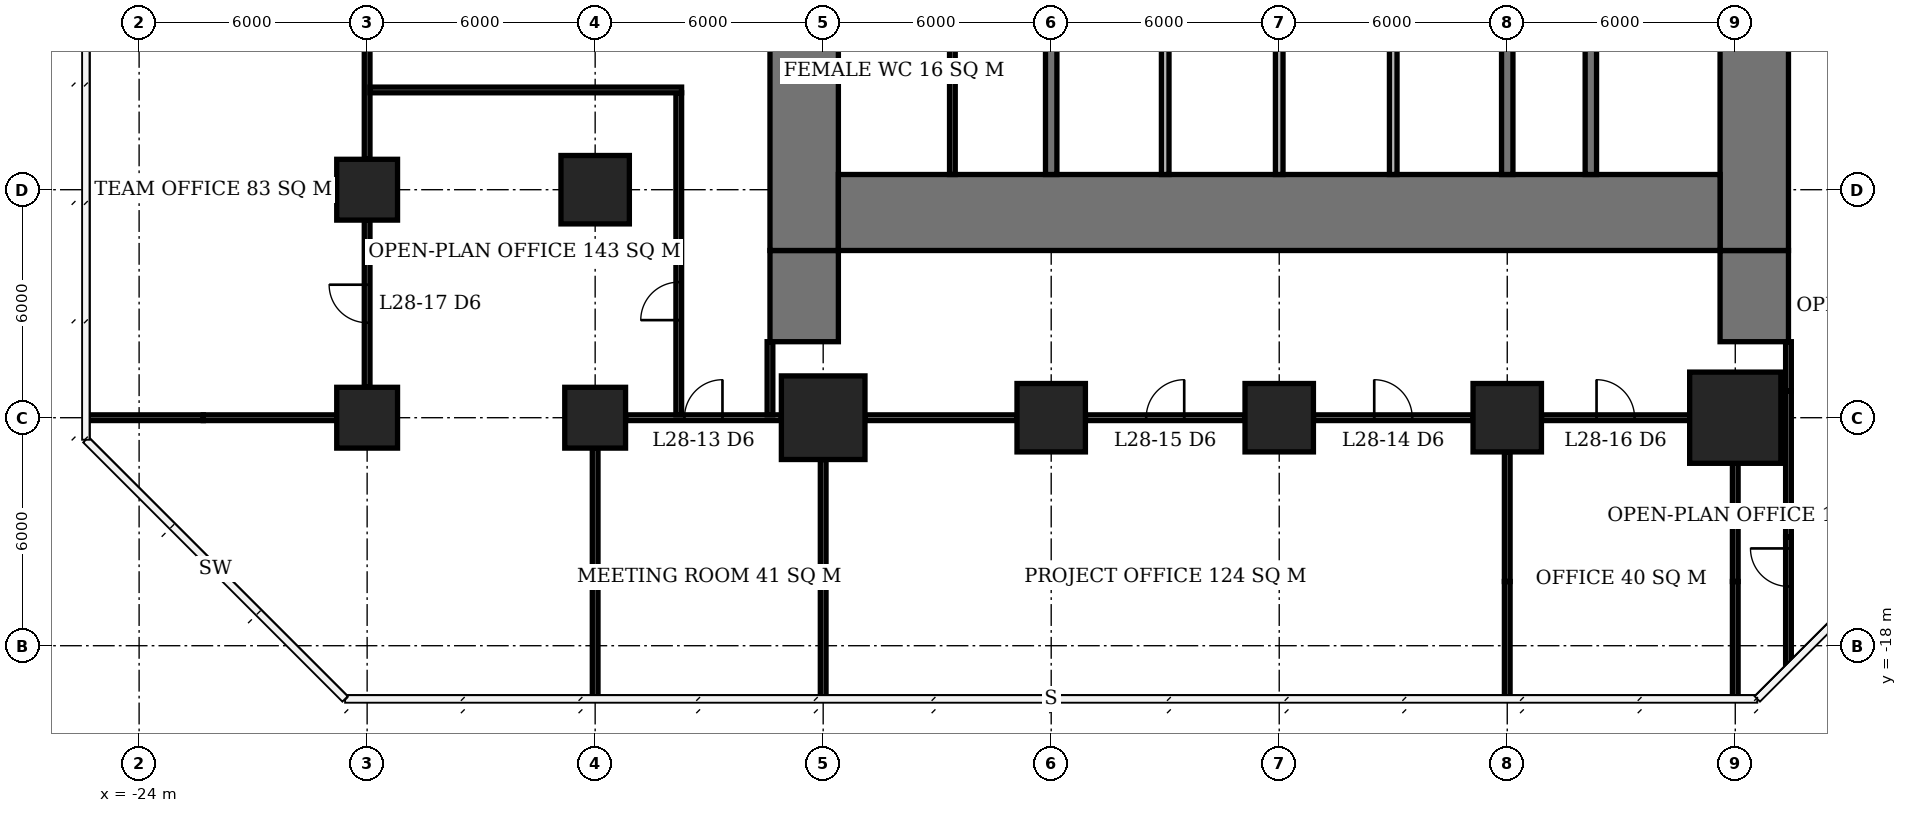
"""IFC4 building model, lengths in metres.
Left out: names, types, materials, properties, quantities, classifications, styles, units other than length and angle.
Written with IfcOpenShell. Run it as: python <this file> out.ifc"""

import sys

from ifc_helpers import new_model, si_unit, direction, frame, frame_2d, origin, origin_2d, place, context, subcontext, project, spatial, rectangle, extrude, element, fill, save


model = new_model("IFC4")
c1 = context("Model", 3, precision=1e-05, world=origin(), true_north=direction((0.0, 1.0)))
c2 = subcontext(c1, "Body", "Model", "MODEL_VIEW")
j1 = project(units=[si_unit("LENGTHUNIT", "METRE"), si_unit("PLANEANGLEUNIT", "RADIAN")], contexts=[c1])
p1 = place(None, origin())
s1 = spatial("IfcSite", under=j1, at=p1, CompositionType="ELEMENT")
p2 = place(p1, origin())
s2 = spatial("IfcBuilding", under=s1, at=p2, CompositionType="ELEMENT")
p3 = place(p2, frame((0.0, 0.0, 117.2)))
s3 = spatial("IfcBuildingStorey", under=s2, at=p3, CompositionType="ELEMENT", Elevation=117.2)
for number, where, z_axis, x_axis in (
    (1, (-18.0, -12.0, 0.0), (0.0, 0.0, 1.0), (1.0, 0.0, 0.0)),
    (2, (-18.0, -6.0, 0.0), (0.0, 0.0, 1.0), (1.0, 0.0, 0.0)),
    (3, (-12.0, -12.0, 0.0), (0.0, 0.0, 1.0), (1.0, 0.0, 0.0)),
):
    element("IfcColumn", number, at=place(p3, frame(where, z_axis=z_axis, x_axis=x_axis)), inside=s3, PredefinedType="COLUMN", context=c2, shape_type="SweptSolid", body=[
        extrude(rectangle(XDim=1.6, YDim=1.6, at=origin_2d()), origin(), (0.0, 0.0, 1.0), 3.9),
    ])
p4 = place(p3, frame((-12.0, -6.0, 0.0), z_axis=(0.0, 0.0, 1.0), x_axis=(1.0, 0.0, 0.0)))
e4 = element("IfcColumn", 4, at=p4, inside=s3, PredefinedType="COLUMN", context=c2, shape_type="SweptSolid", body=[
    extrude(rectangle(XDim=1.8, YDim=1.8, at=origin_2d()), origin(), (0.0, 0.0, 1.0), 3.9),
])
p5 = place(p3, frame((-6.0, -12.0, 0.0), z_axis=(0.0, 0.0, 1.0), x_axis=(1.0, 0.0, 0.0)))
e5 = element("IfcColumn", 5, at=p5, inside=s3, PredefinedType="COLUMN", context=c2, shape_type="SweptSolid", body=[
    extrude(rectangle(XDim=2.2, YDim=2.2, at=origin_2d()), origin(), (0.0, 0.0, 1.0), 3.9),
])
for number, where, z_axis, x_axis in (
    (6, (0.0, -12.0, 0.0), (0.0, 0.0, 1.0), (1.0, 0.0, 0.0)),
    (7, (6.0, -12.0, 0.0), (0.0, 0.0, 1.0), (1.0, 0.0, 0.0)),
    (8, (12.0, -12.0, 0.0), (0.0, 0.0, 1.0), (1.0, 0.0, 0.0)),
):
    element("IfcColumn", number, at=place(p3, frame(where, z_axis=z_axis, x_axis=x_axis)), inside=s3, PredefinedType="COLUMN", context=c2, shape_type="SweptSolid", body=[
        extrude(rectangle(XDim=1.8, YDim=1.8, at=origin_2d()), origin(), (0.0, 0.0, 1.0), 3.9),
    ])
p6 = place(p3, frame((18.0, -12.0, 0.0), z_axis=(0.0, 0.0, 1.0), x_axis=(1.0, 0.0, 0.0)))
e9 = element("IfcColumn", 9, at=p6, inside=s3, PredefinedType="COLUMN", context=c2, shape_type="SweptSolid", body=[
    extrude(rectangle(XDim=2.4, YDim=2.4, at=origin_2d()), origin(), (0.0, 0.0, 1.0), 3.9),
])
p7 = place(p3, frame((-5.6, -6.6, 0.0), z_axis=(0.0, 0.0, 1.0), x_axis=(1.0, 0.0, 0.0)))
e10 = element("IfcWall", 10, at=p7, inside=s3, PredefinedType="SHEAR", context=c2, shape_type="SweptSolid", body=[
    extrude(rectangle(XDim=23.2, YDim=2.0, at=frame_2d((11.6, 0.0))), origin(), (0.0, 0.0, 1.0), 3.9),
])
p8 = place(p3, frame((-6.5, -7.6, 0.0), z_axis=(0.0, 0.0, 1.0), x_axis=(0.0, 1.0, 0.0)))
e11 = element("IfcWall", 11, at=p8, inside=s3, PredefinedType="SHEAR", context=c2, shape_type="SweptSolid", body=[
    extrude(rectangle(XDim=21.2, YDim=1.8, at=frame_2d((10.6, 0.0))), origin(), (0.0, 0.0, 1.0), 3.9),
])
p9 = place(p8, frame((7.8, 0.0, 0.0)))
e12 = element("IfcOpeningElement", 12, at=p9, cuts=e11, PredefinedType="OPENING", context=c2, shape_type="SweptSolid", body=[
    extrude(rectangle(XDim=1.8, YDim=2.4, at=frame_2d((0.9, 1.2))), frame((0.0, 0.91, 0.0), z_axis=(0.0, -1.0, 0.0), x_axis=(1.0, 0.0, 0.0)), (0.0, 0.0, 1.0), 1.82),
])
p10 = place(p3, frame((18.5, -7.6, 0.0), z_axis=(0.0, 0.0, 1.0), x_axis=(0.0, 1.0, 0.0)))
e13 = element("IfcWall", 13, at=p10, inside=s3, PredefinedType="SHEAR", context=c2, shape_type="SweptSolid", body=[
    extrude(rectangle(XDim=21.2, YDim=1.8, at=frame_2d((10.6, 0.0))), origin(), (0.0, 0.0, 1.0), 3.9),
])
p11 = place(p10, frame((9.2, 0.0, 0.0)))
e14 = element("IfcOpeningElement", 14, at=p11, cuts=e13, PredefinedType="OPENING", context=c2, shape_type="SweptSolid", body=[
    extrude(rectangle(XDim=1.8, YDim=2.4, at=frame_2d((0.9, 1.2))), frame((0.0, 0.91, 0.0), z_axis=(0.0, -1.0, 0.0), x_axis=(1.0, 0.0, 0.0)), (0.0, 0.0, 1.0), 1.82),
])
for number, where, z_axis, x_axis in (
    (15, (-6.5, -10.0, 0.0), (0.0, 0.0, 1.0), (0.0, 1.0, 0.0)),
    (16, (18.5, -10.0, 0.0), (0.0, 0.0, 1.0), (0.0, 1.0, 0.0)),
):
    element("IfcWall", number, at=place(p3, frame(where, z_axis=z_axis, x_axis=x_axis)), inside=s3, PredefinedType="SHEAR", context=c2, shape_type="SweptSolid", body=[
        extrude(rectangle(XDim=2.4, YDim=1.8, at=frame_2d((1.2, 0.0))), origin(), (0.0, 0.0, 1.0), 3.9),
    ])
for number, where, z_axis, x_axis in (
    (17, (0.0, -5.6, 0.0), (0.0, 0.0, 1.0), (0.0, 1.0, 0.0)),
    (18, (12.0, -5.6, 0.0), (0.0, 0.0, 1.0), (0.0, 1.0, 0.0)),
):
    element("IfcWall", number, at=place(p3, frame(where, z_axis=z_axis, x_axis=x_axis)), inside=s3, PredefinedType="SHEAR", context=c2, shape_type="SweptSolid", body=[
        extrude(rectangle(XDim=5.45, YDim=0.3, at=frame_2d((2.725, 0.0))), origin(), (0.0, 0.0, 1.0), 3.9),
    ])
p12 = place(p3, frame((14.2, -5.6, 0.0), z_axis=(0.0, 0.0, 1.0), x_axis=(0.0, 1.0, 0.0)))
e19 = element("IfcWall", 19, at=p12, inside=s3, PredefinedType="SHEAR", context=c2, shape_type="SweptSolid", body=[
    extrude(rectangle(XDim=8.45, YDim=0.3, at=frame_2d((4.225, 0.0))), origin(), (0.0, 0.0, 1.0), 3.9),
])
for number, where, z_axis, x_axis in (
    (20, (3.0, -5.6, 0.0), (0.0, 0.0, 1.0), (0.0, 1.0, 0.0)),
    (21, (6.0, -5.6, 0.0), (0.0, 0.0, 1.0), (0.0, 1.0, 0.0)),
    (22, (9.0, -5.6, 0.0), (0.0, 0.0, 1.0), (0.0, 1.0, 0.0)),
):
    element("IfcWall", number, at=place(p3, frame(where, z_axis=z_axis, x_axis=x_axis)), inside=s3, PredefinedType="SOLIDWALL", context=c2, shape_type="SweptSolid", body=[
        extrude(rectangle(XDim=5.45, YDim=0.2, at=frame_2d((2.725, 0.0))), origin(), (0.0, 0.0, 1.0), 3.9),
    ])
p13 = place(p3, frame((-2.6, -5.6, 0.0), z_axis=(0.0, 0.0, 1.0), x_axis=(0.0, 1.0, 0.0)))
e23 = element("IfcWall", 23, at=p13, inside=s3, PredefinedType="PLUMBINGWALL", context=c2, shape_type="SweptSolid", body=[
    extrude(rectangle(XDim=5.45, YDim=0.15, at=frame_2d((2.725, 0.0))), origin(), (0.0, 0.0, 1.0), 3.65),
])
p14 = place(p3, frame((-25.4, -12.0, 0.0), z_axis=(0.0, 0.0, 1.0), x_axis=(1.0, 0.0, 0.0)))
e24 = element("IfcWall", 24, at=p14, inside=s3, PredefinedType="PARTITIONING", context=c2, shape_type="SweptSolid", body=[
    extrude(rectangle(XDim=3.09, YDim=0.15, at=frame_2d((1.545, 0.0))), origin(), (0.0, 0.0, 1.0), 3.65),
])
p15 = place(p3, frame((-22.31, -12.0, 0.0), z_axis=(0.0, 0.0, 1.0), x_axis=(1.0, 0.0, 0.0)))
e25 = element("IfcWall", 25, at=p15, inside=s3, PredefinedType="PARTITIONING", context=c2, shape_type="SweptSolid", body=[
    extrude(rectangle(XDim=3.51, YDim=0.15, at=frame_2d((1.755, 0.0))), origin(), (0.0, 0.0, 1.0), 2.65),
])
p16 = place(p3, frame((-11.2, -12.0, 0.0), z_axis=(0.0, 0.0, 1.0), x_axis=(1.0, 0.0, 0.0)))
e26 = element("IfcWall", 26, at=p16, inside=s3, PredefinedType="PARTITIONING", context=c2, shape_type="SweptSolid", body=[
    extrude(rectangle(XDim=4.1, YDim=0.15, at=frame_2d((2.05, 0.0))), origin(), (0.0, 0.0, 1.0), 3.65),
])
p17 = place(p16, frame((1.55, 0.0, 0.0)))
e27 = element("IfcOpeningElement", 27, at=p17, cuts=e26, PredefinedType="OPENING", context=c2, shape_type="SweptSolid", body=[
    extrude(rectangle(XDim=1.0, YDim=2.1, at=frame_2d((0.5, 1.05))), frame((0.0, 0.085, 0.0), z_axis=(0.0, -1.0, 0.0), x_axis=(1.0, 0.0, 0.0)), (0.0, 0.0, 1.0), 0.17),
])
p18 = place(p3, frame((-4.9, -12.0, 0.0), z_axis=(0.0, 0.0, 1.0), x_axis=(1.0, 0.0, 0.0)))
e28 = element("IfcWall", 28, at=p18, inside=s3, PredefinedType="PARTITIONING", context=c2, shape_type="SweptSolid", body=[
    extrude(rectangle(XDim=4.0, YDim=0.15, at=frame_2d((2.0, 0.0))), origin(), (0.0, 0.0, 1.0), 3.65),
])
p19 = place(p3, frame((0.9, -12.0, 0.0), z_axis=(0.0, 0.0, 1.0), x_axis=(1.0, 0.0, 0.0)))
e29 = element("IfcWall", 29, at=p19, inside=s3, PredefinedType="PARTITIONING", context=c2, shape_type="SweptSolid", body=[
    extrude(rectangle(XDim=4.2, YDim=0.15, at=frame_2d((2.1, 0.0))), origin(), (0.0, 0.0, 1.0), 3.65),
])
p20 = place(p19, frame((1.6, 0.0, 0.0)))
e30 = element("IfcOpeningElement", 30, at=p20, cuts=e29, PredefinedType="OPENING", context=c2, shape_type="SweptSolid", body=[
    extrude(rectangle(XDim=1.0, YDim=2.1, at=frame_2d((0.5, 1.05))), frame((0.0, 0.085, 0.0), z_axis=(0.0, -1.0, 0.0), x_axis=(1.0, 0.0, 0.0)), (0.0, 0.0, 1.0), 0.17),
])
p21 = place(p3, frame((6.9, -12.0, 0.0), z_axis=(0.0, 0.0, 1.0), x_axis=(1.0, 0.0, 0.0)))
e31 = element("IfcWall", 31, at=p21, inside=s3, PredefinedType="PARTITIONING", context=c2, shape_type="SweptSolid", body=[
    extrude(rectangle(XDim=4.2, YDim=0.15, at=frame_2d((2.1, 0.0))), origin(), (0.0, 0.0, 1.0), 3.65),
])
p22 = place(p21, frame((1.6, 0.0, 0.0)))
e32 = element("IfcOpeningElement", 32, at=p22, cuts=e31, PredefinedType="OPENING", context=c2, shape_type="SweptSolid", body=[
    extrude(rectangle(XDim=1.0, YDim=2.1, at=frame_2d((0.5, 1.05))), frame((0.0, 0.085, 0.0), z_axis=(0.0, -1.0, 0.0), x_axis=(1.0, 0.0, 0.0)), (0.0, 0.0, 1.0), 0.17),
])
p23 = place(p3, frame((12.9, -12.0, 0.0), z_axis=(0.0, 0.0, 1.0), x_axis=(1.0, 0.0, 0.0)))
e33 = element("IfcWall", 33, at=p23, inside=s3, PredefinedType="PARTITIONING", context=c2, shape_type="SweptSolid", body=[
    extrude(rectangle(XDim=3.9, YDim=0.15, at=frame_2d((1.95, 0.0))), origin(), (0.0, 0.0, 1.0), 3.65),
])
p24 = place(p23, frame((1.45, 0.0, 0.0)))
e34 = element("IfcOpeningElement", 34, at=p24, cuts=e33, PredefinedType="OPENING", context=c2, shape_type="SweptSolid", body=[
    extrude(rectangle(XDim=1.0, YDim=2.1, at=frame_2d((0.5, 1.05))), frame((0.0, 0.085, 0.0), z_axis=(0.0, -1.0, 0.0), x_axis=(1.0, 0.0, 0.0)), (0.0, 0.0, 1.0), 0.17),
])
p25 = place(p3, frame((-18.0, -11.2, 0.0), z_axis=(0.0, 0.0, 1.0), x_axis=(0.0, 1.0, 0.0)))
e35 = element("IfcWall", 35, at=p25, inside=s3, PredefinedType="PARTITIONING", context=c2, shape_type="SweptSolid", body=[
    extrude(rectangle(XDim=4.4, YDim=0.15, at=frame_2d((2.2, 0.0))), origin(), (0.0, 0.0, 1.0), 3.65),
])
p26 = place(p25, frame((1.7, 0.0, 0.0)))
e36 = element("IfcOpeningElement", 36, at=p26, cuts=e35, PredefinedType="OPENING", context=c2, shape_type="SweptSolid", body=[
    extrude(rectangle(XDim=1.0, YDim=2.1, at=frame_2d((0.5, 1.05))), frame((0.0, 0.085, 0.0), z_axis=(0.0, -1.0, 0.0), x_axis=(1.0, 0.0, 0.0)), (0.0, 0.0, 1.0), 0.17),
])
p27 = place(p3, frame((-18.0, -5.2, 0.0), z_axis=(0.0, 0.0, 1.0), x_axis=(0.0, 1.0, 0.0)))
e37 = element("IfcWall", 37, at=p27, inside=s3, PredefinedType="PARTITIONING", context=c2, shape_type="SweptSolid", body=[
    extrude(rectangle(XDim=4.4, YDim=0.15, at=frame_2d((2.2, 0.0))), origin(), (0.0, 0.0, 1.0), 3.65),
])
p28 = place(p3, frame((-12.0, -19.4, 0.0), z_axis=(0.0, 0.0, 1.0), x_axis=(0.0, 1.0, 0.0)))
e38 = element("IfcWall", 38, at=p28, inside=s3, PredefinedType="PARTITIONING", context=c2, shape_type="SweptSolid", body=[
    extrude(rectangle(XDim=3.09, YDim=0.15, at=frame_2d((1.545, 0.0))), origin(), (0.0, 0.0, 1.0), 3.65),
])
p29 = place(p3, frame((-12.0, -16.31, 0.0), z_axis=(0.0, 0.0, 1.0), x_axis=(0.0, 1.0, 0.0)))
e39 = element("IfcWall", 39, at=p29, inside=s3, PredefinedType="PARTITIONING", context=c2, shape_type="SweptSolid", body=[
    extrude(rectangle(XDim=3.51, YDim=0.15, at=frame_2d((1.755, 0.0))), origin(), (0.0, 0.0, 1.0), 2.65),
])
p30 = place(p3, frame((-6.0, -19.4, 0.0), z_axis=(0.0, 0.0, 1.0), x_axis=(0.0, 1.0, 0.0)))
e40 = element("IfcWall", 40, at=p30, inside=s3, PredefinedType="PARTITIONING", context=c2, shape_type="SweptSolid", body=[
    extrude(rectangle(XDim=3.09, YDim=0.15, at=frame_2d((1.545, 0.0))), origin(), (0.0, 0.0, 1.0), 3.65),
])
p31 = place(p3, frame((-6.0, -16.31, 0.0), z_axis=(0.0, 0.0, 1.0), x_axis=(0.0, 1.0, 0.0)))
e41 = element("IfcWall", 41, at=p31, inside=s3, PredefinedType="PARTITIONING", context=c2, shape_type="SweptSolid", body=[
    extrude(rectangle(XDim=3.21, YDim=0.15, at=frame_2d((1.605, 0.0))), origin(), (0.0, 0.0, 1.0), 2.65),
])
p32 = place(p3, frame((12.0, -19.4, 0.0), z_axis=(0.0, 0.0, 1.0), x_axis=(0.0, 1.0, 0.0)))
e42 = element("IfcWall", 42, at=p32, inside=s3, PredefinedType="PARTITIONING", context=c2, shape_type="SweptSolid", body=[
    extrude(rectangle(XDim=3.09, YDim=0.15, at=frame_2d((1.545, 0.0))), origin(), (0.0, 0.0, 1.0), 3.65),
])
p33 = place(p3, frame((12.0, -16.31, 0.0), z_axis=(0.0, 0.0, 1.0), x_axis=(0.0, 1.0, 0.0)))
e43 = element("IfcWall", 43, at=p33, inside=s3, PredefinedType="PARTITIONING", context=c2, shape_type="SweptSolid", body=[
    extrude(rectangle(XDim=3.41, YDim=0.15, at=frame_2d((1.705, 0.0))), origin(), (0.0, 0.0, 1.0), 2.65),
])
p34 = place(p3, frame((18.0, -19.4, 0.0), z_axis=(0.0, 0.0, 1.0), x_axis=(0.0, 1.0, 0.0)))
e44 = element("IfcWall", 44, at=p34, inside=s3, PredefinedType="PARTITIONING", context=c2, shape_type="SweptSolid", body=[
    extrude(rectangle(XDim=3.09, YDim=0.15, at=frame_2d((1.545, 0.0))), origin(), (0.0, 0.0, 1.0), 3.65),
])
p35 = place(p3, frame((18.0, -16.31, 0.0), z_axis=(0.0, 0.0, 1.0), x_axis=(0.0, 1.0, 0.0)))
e45 = element("IfcWall", 45, at=p35, inside=s3, PredefinedType="PARTITIONING", context=c2, shape_type="SweptSolid", body=[
    extrude(rectangle(XDim=3.11, YDim=0.15, at=frame_2d((1.555, 0.0))), origin(), (0.0, 0.0, 1.0), 2.65),
])
p36 = place(p3, frame((-17.925, -3.375, 0.0), z_axis=(0.0, 0.0, 1.0), x_axis=(1.0, 0.0, 0.0)))
e46 = element("IfcWall", 46, at=p36, inside=s3, PredefinedType="PARTITIONING", context=c2, shape_type="SweptSolid", body=[
    extrude(rectangle(XDim=8.2, YDim=0.15, at=frame_2d((4.1, 0.0))), origin(), (0.0, 0.0, 1.0), 3.65),
])
p37 = place(p3, frame((-9.8, -11.925, 0.0), z_axis=(0.0, 0.0, 1.0), x_axis=(0.0, 1.0, 0.0)))
e47 = element("IfcWall", 47, at=p37, inside=s3, PredefinedType="PARTITIONING", context=c2, shape_type="SweptSolid", body=[
    extrude(rectangle(XDim=8.475, YDim=0.15, at=frame_2d((4.238, 0.0))), origin(), (0.0, 0.0, 1.0), 3.65),
])
p38 = place(p37, frame((2.493, 0.0, 0.0)))
e48 = element("IfcOpeningElement", 48, at=p38, cuts=e47, PredefinedType="OPENING", context=c2, shape_type="SweptSolid", body=[
    extrude(rectangle(XDim=1.0, YDim=2.1, at=frame_2d((0.5, 1.05))), frame((0.0, 0.085, 0.0), z_axis=(0.0, -1.0, 0.0), x_axis=(1.0, 0.0, 0.0)), (0.0, 0.0, 1.0), 0.17),
])
p39 = place(p3, frame((-7.4, -11.925, 0.0), z_axis=(0.0, 0.0, 1.0), x_axis=(0.0, 1.0, 0.0)))
e49 = element("IfcWall", 49, at=p39, inside=s3, PredefinedType="PARTITIONING", context=c2, shape_type="SweptSolid", body=[
    extrude(rectangle(XDim=1.925, YDim=0.15, at=frame_2d((0.962, 0.0))), origin(), (0.0, 0.0, 1.0), 3.65),
])
p40 = place(p3, frame((19.4, -18.489, 0.0), z_axis=(0.0, 0.0, 1.0), x_axis=(0.0, 1.0, 0.0)))
e50 = element("IfcWall", 50, at=p40, inside=s3, PredefinedType="PARTITIONING", context=c2, shape_type="SweptSolid", body=[
    extrude(rectangle(XDim=3.349, YDim=0.15, at=frame_2d((1.675, 0.0))), origin(), (0.0, 0.0, 1.0), 3.65),
])
p41 = place(p40, frame((2.049, 0.0, 0.0)))
e51 = element("IfcOpeningElement", 51, at=p41, cuts=e50, PredefinedType="OPENING", context=c2, shape_type="SweptSolid", body=[
    extrude(rectangle(XDim=1.0, YDim=2.1, at=frame_2d((0.5, 1.05))), frame((0.0, 0.085, 0.0), z_axis=(0.0, -1.0, 0.0), x_axis=(1.0, 0.0, 0.0)), (0.0, 0.0, 1.0), 0.17),
])
p42 = place(p3, frame((19.4, -15.14, 0.0), z_axis=(0.0, 0.0, 1.0), x_axis=(0.0, 1.0, 0.0)))
e52 = element("IfcWall", 52, at=p42, inside=s3, PredefinedType="PARTITIONING", context=c2, shape_type="SweptSolid", body=[
    extrude(rectangle(XDim=3.85, YDim=0.15, at=frame_2d((1.925, 0.0))), origin(), (0.0, 0.0, 1.0), 2.65),
])
p43 = place(p3, frame((19.4, -11.29, 0.0), z_axis=(0.0, 0.0, 1.0), x_axis=(0.0, 1.0, 0.0)))
e53 = element("IfcWall", 53, at=p43, inside=s3, PredefinedType="PARTITIONING", context=c2, shape_type="SweptSolid", body=[
    extrude(rectangle(XDim=1.29, YDim=0.15, at=frame_2d((0.645, 0.0))), origin(), (0.0, 0.0, 1.0), 3.65),
])
p44 = place(p17, origin())
e54 = element("IfcDoor", 54, at=p44, inside=s3, OperationType="SINGLE_SWING_RIGHT", PredefinedType="DOOR", context=c2, shape_type="SweptSolid", body=[
    extrude(rectangle(XDim=1.0, YDim=2.1, at=frame_2d((0.5, 1.05))), frame((0.0, 0.025, 0.0), z_axis=(0.0, -1.0, 0.0), x_axis=(1.0, 0.0, 0.0)), (0.0, 0.0, 1.0), 0.05),
])
fill(e27, e54)
p45 = place(p22, origin())
e55 = element("IfcDoor", 55, at=p45, inside=s3, OperationType="SINGLE_SWING_LEFT", PredefinedType="DOOR", context=c2, shape_type="SweptSolid", body=[
    extrude(rectangle(XDim=1.0, YDim=2.1, at=frame_2d((0.5, 1.05))), frame((0.0, 0.025, 0.0), z_axis=(0.0, -1.0, 0.0), x_axis=(1.0, 0.0, 0.0)), (0.0, 0.0, 1.0), 0.05),
])
fill(e32, e55)
p46 = place(p20, origin())
e56 = element("IfcDoor", 56, at=p46, inside=s3, OperationType="SINGLE_SWING_RIGHT", PredefinedType="DOOR", context=c2, shape_type="SweptSolid", body=[
    extrude(rectangle(XDim=1.0, YDim=2.1, at=frame_2d((0.5, 1.05))), frame((0.0, 0.025, 0.0), z_axis=(0.0, -1.0, 0.0), x_axis=(1.0, 0.0, 0.0)), (0.0, 0.0, 1.0), 0.05),
])
fill(e30, e56)
p47 = place(p24, origin())
e57 = element("IfcDoor", 57, at=p47, inside=s3, OperationType="SINGLE_SWING_LEFT", PredefinedType="DOOR", context=c2, shape_type="SweptSolid", body=[
    extrude(rectangle(XDim=1.0, YDim=2.1, at=frame_2d((0.5, 1.05))), frame((0.0, 0.025, 0.0), z_axis=(0.0, -1.0, 0.0), x_axis=(1.0, 0.0, 0.0)), (0.0, 0.0, 1.0), 0.05),
])
fill(e34, e57)
p48 = place(p26, origin())
e58 = element("IfcDoor", 58, at=p48, inside=s3, OperationType="SINGLE_SWING_RIGHT", PredefinedType="DOOR", context=c2, shape_type="SweptSolid", body=[
    extrude(rectangle(XDim=1.0, YDim=2.1, at=frame_2d((0.5, 1.05))), frame((0.0, 0.025, 0.0), z_axis=(0.0, -1.0, 0.0), x_axis=(1.0, 0.0, 0.0)), (0.0, 0.0, 1.0), 0.05),
])
fill(e36, e58)
p49 = place(p38, origin())
e59 = element("IfcDoor", 59, at=p49, inside=s3, OperationType="SINGLE_SWING_LEFT", PredefinedType="DOOR", context=c2, shape_type="SweptSolid", body=[
    extrude(rectangle(XDim=1.0, YDim=2.1, at=frame_2d((0.5, 1.05))), frame((0.0, 0.025, 0.0), z_axis=(0.0, -1.0, 0.0), x_axis=(1.0, 0.0, 0.0)), (0.0, 0.0, 1.0), 0.05),
])
fill(e48, e59)
p50 = place(p41, origin())
e60 = element("IfcDoor", 60, at=p50, inside=s3, OperationType="SINGLE_SWING_RIGHT", PredefinedType="DOOR", context=c2, shape_type="SweptSolid", body=[
    extrude(rectangle(XDim=1.0, YDim=2.1, at=frame_2d((0.5, 1.05))), frame((0.0, 0.025, 0.0), z_axis=(0.0, -1.0, 0.0), x_axis=(1.0, 0.0, 0.0)), (0.0, 0.0, 1.0), 0.05),
])
fill(e51, e60)
save(model, sys.argv[1])
